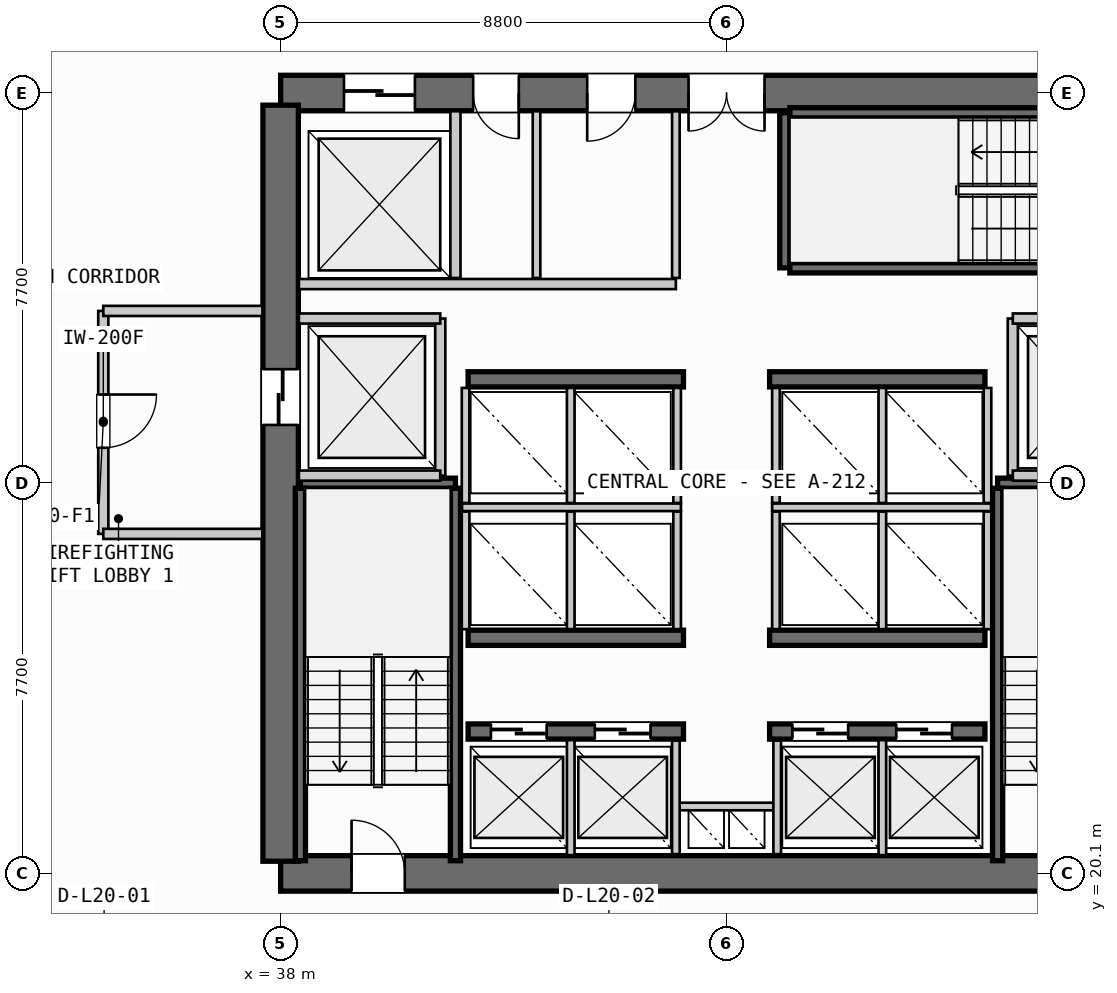
"""IFC4 building model, lengths in metres.
Left out: names, types, materials, properties, quantities, classifications, styles, units other than length and angle.
Written with IfcOpenShell. Run it as: python <this file> out.ifc"""

import sys

from ifc_helpers import new_model, si_unit, direction, frame, frame_2d, origin, place, context, subcontext, project, spatial, rectangle, extrude, source, transform, mapped, element, fill, save


model = new_model("IFC4")
c1 = context("Model", 3, precision=1e-05, world=origin(), true_north=direction((0.0, 1.0)))
c2 = subcontext(c1, "Body", "Model", "MODEL_VIEW")
j1 = project(units=[si_unit("LENGTHUNIT", "METRE"), si_unit("PLANEANGLEUNIT", "RADIAN")], contexts=[c1])
p1 = place(None, origin())
s1 = spatial("IfcSite", under=j1, at=p1, CompositionType="ELEMENT")
p2 = place(p1, origin())
s2 = spatial("IfcBuilding", under=s1, at=p2, CompositionType="ELEMENT")
p3 = place(p2, frame((0.0, 0.0, 85.6)))
s3 = spatial("IfcBuildingStorey", under=s2, at=p3, CompositionType="ELEMENT", Elevation=85.6)
p4 = place(p3, frame((38.0, 20.1, 0.0), z_axis=(0.0, 0.0, 1.0), x_axis=(1.0, 0.0, 0.0)))
e1 = element("IfcWall", 1, at=p4, inside=s3, PredefinedType="SHEAR", context=c2, shape_type="SweptSolid", body=[
    extrude(rectangle(XDim=17.6, YDim=0.7, at=frame_2d((8.8, 0.0))), origin(), (0.0, 0.0, 1.0), 3.35),
])
p5 = place(p4, frame((1.4, 0.0, 0.0)))
e2 = element("IfcOpeningElement", 2, at=p5, cuts=e1, PredefinedType="OPENING", context=c2, shape_type="SweptSolid", body=[
    extrude(rectangle(XDim=1.05, YDim=2.15, at=frame_2d((0.525, 1.075))), frame((0.0, 0.36, 0.0), z_axis=(0.0, -1.0, 0.0), x_axis=(1.0, 0.0, 0.0)), (0.0, 0.0, 1.0), 0.72),
])
p6 = place(p4, frame((15.15, 0.0, 0.0)))
e3 = element("IfcOpeningElement", 3, at=p6, cuts=e1, PredefinedType="OPENING", context=c2, shape_type="SweptSolid", body=[
    extrude(rectangle(XDim=1.05, YDim=2.15, at=frame_2d((0.525, 1.075))), frame((0.0, 0.36, 0.0), z_axis=(0.0, -1.0, 0.0), x_axis=(1.0, 0.0, 0.0)), (0.0, 0.0, 1.0), 0.72),
])
p7 = place(p3, frame((55.6, 35.5, 0.0), z_axis=(0.0, 0.0, 1.0), x_axis=(-1.0, 0.0, 0.0)))
e4 = element("IfcWall", 4, at=p7, inside=s3, PredefinedType="SHEAR", context=c2, shape_type="SweptSolid", body=[
    extrude(rectangle(XDim=17.6, YDim=0.7, at=frame_2d((8.8, 0.0))), origin(), (0.0, 0.0, 1.0), 3.35),
])
p8 = place(p7, frame((8.05, 0.0, 0.0)))
e5 = element("IfcOpeningElement", 5, at=p8, cuts=e4, PredefinedType="OPENING", context=c2, shape_type="SweptSolid", body=[
    extrude(rectangle(XDim=1.5, YDim=2.2, at=frame_2d((0.75, 1.1))), frame((0.0, 0.36, 0.0), z_axis=(0.0, -1.0, 0.0), x_axis=(1.0, 0.0, 0.0)), (0.0, 0.0, 1.0), 0.72),
])
p9 = place(p7, frame((14.95, 0.0, 0.0)))
e6 = element("IfcOpeningElement", 6, at=p9, cuts=e4, PredefinedType="OPENING", context=c2, shape_type="SweptSolid", body=[
    extrude(rectangle(XDim=1.4, YDim=2.3, at=frame_2d((0.7, 1.15))), frame((0.0, 0.36, 0.0), z_axis=(0.0, -1.0, 0.0), x_axis=(1.0, 0.0, 0.0)), (0.0, 0.0, 1.0), 0.72),
])
p10 = place(p7, frame((12.9, 0.0, 0.0)))
e7 = element("IfcOpeningElement", 7, at=p10, cuts=e4, PredefinedType="OPENING", context=c2, shape_type="SweptSolid", body=[
    extrude(rectangle(XDim=0.9, YDim=2.15, at=frame_2d((0.45, 1.075))), frame((0.0, 0.36, 0.0), z_axis=(0.0, -1.0, 0.0), x_axis=(1.0, 0.0, 0.0)), (0.0, 0.0, 1.0), 0.72),
])
p11 = place(p7, frame((10.6, 0.0, 0.0)))
e8 = element("IfcOpeningElement", 8, at=p11, cuts=e4, PredefinedType="OPENING", context=c2, shape_type="SweptSolid", body=[
    extrude(rectangle(XDim=0.95, YDim=2.15, at=frame_2d((0.475, 1.075))), frame((0.0, 0.36, 0.0), z_axis=(0.0, -1.0, 0.0), x_axis=(1.0, 0.0, 0.0)), (0.0, 0.0, 1.0), 0.72),
])
p12 = place(p3, frame((38.0, 35.26, 0.0), z_axis=(0.0, 0.0, 1.0), x_axis=(0.0, -1.0, 0.0)))
e9 = element("IfcWall", 9, at=p12, inside=s3, PredefinedType="SHEAR", context=c2, shape_type="SweptSolid", body=[
    extrude(rectangle(XDim=14.92, YDim=0.7, at=frame_2d((7.46, 0.0))), origin(), (0.0, 0.0, 1.0), 3.35),
])
p13 = place(p12, frame((5.21, 0.0, 0.0)))
e10 = element("IfcOpeningElement", 10, at=p13, cuts=e9, PredefinedType="OPENING", context=c2, shape_type="SweptSolid", body=[
    extrude(rectangle(XDim=1.1, YDim=2.2, at=frame_2d((0.55, 1.1))), frame((0.0, 0.36, 0.0), z_axis=(0.0, -1.0, 0.0), x_axis=(1.0, 0.0, 0.0)), (0.0, 0.0, 1.0), 0.72),
])
p14 = place(p3, frame((41.7, 22.9, 0.0), z_axis=(0.0, 0.0, 1.0), x_axis=(1.0, 0.0, 0.0)))
e11 = element("IfcWall", 11, at=p14, inside=s3, PredefinedType="SHEAR", context=c2, shape_type="SweptSolid", body=[
    extrude(rectangle(XDim=4.25, YDim=0.3, at=frame_2d((2.125, 0.0))), origin(), (0.0, 0.0, 1.0), 3.35),
])
p15 = place(p14, frame((0.45, 0.0, 0.0)))
e12 = element("IfcOpeningElement", 12, at=p15, cuts=e11, PredefinedType="OPENING", context=c2, shape_type="SweptSolid", body=[
    extrude(rectangle(XDim=1.1, YDim=2.2, at=frame_2d((0.55, 1.1))), frame((0.0, 0.16, 0.0), z_axis=(0.0, -1.0, 0.0), x_axis=(1.0, 0.0, 0.0)), (0.0, 0.0, 1.0), 0.32),
])
p16 = place(p14, frame((2.5, 0.0, 0.0)))
e13 = element("IfcOpeningElement", 13, at=p16, cuts=e11, PredefinedType="OPENING", context=c2, shape_type="SweptSolid", body=[
    extrude(rectangle(XDim=1.1, YDim=2.2, at=frame_2d((0.55, 1.1))), frame((0.0, 0.16, 0.0), z_axis=(0.0, -1.0, 0.0), x_axis=(1.0, 0.0, 0.0)), (0.0, 0.0, 1.0), 0.32),
])
p17 = place(p3, frame((47.65, 22.9, 0.0), z_axis=(0.0, 0.0, 1.0), x_axis=(1.0, 0.0, 0.0)))
e14 = element("IfcWall", 14, at=p17, inside=s3, PredefinedType="SHEAR", context=c2, shape_type="SweptSolid", body=[
    extrude(rectangle(XDim=4.25, YDim=0.3, at=frame_2d((2.125, 0.0))), origin(), (0.0, 0.0, 1.0), 3.35),
])
p18 = place(p17, frame((0.45, 0.0, 0.0)))
e15 = element("IfcOpeningElement", 15, at=p18, cuts=e14, PredefinedType="OPENING", context=c2, shape_type="SweptSolid", body=[
    extrude(rectangle(XDim=1.1, YDim=2.2, at=frame_2d((0.55, 1.1))), frame((0.0, 0.16, 0.0), z_axis=(0.0, -1.0, 0.0), x_axis=(1.0, 0.0, 0.0)), (0.0, 0.0, 1.0), 0.32),
])
p19 = place(p17, frame((2.5, 0.0, 0.0)))
e16 = element("IfcOpeningElement", 16, at=p19, cuts=e14, PredefinedType="OPENING", context=c2, shape_type="SweptSolid", body=[
    extrude(rectangle(XDim=1.1, YDim=2.2, at=frame_2d((0.55, 1.1))), frame((0.0, 0.16, 0.0), z_axis=(0.0, -1.0, 0.0), x_axis=(1.0, 0.0, 0.0)), (0.0, 0.0, 1.0), 0.32),
])
for number, where, z_axis, x_axis in (
    (17, (41.7, 24.75, 0.0), (0.0, 0.0, 1.0), (1.0, 0.0, 0.0)),
    (18, (47.65, 24.75, 0.0), (0.0, 0.0, 1.0), (1.0, 0.0, 0.0)),
    (19, (41.7, 29.85, 0.0), (0.0, 0.0, 1.0), (1.0, 0.0, 0.0)),
    (20, (47.65, 29.85, 0.0), (0.0, 0.0, 1.0), (1.0, 0.0, 0.0)),
):
    element("IfcWall", number, at=place(p3, frame(where, z_axis=z_axis, x_axis=x_axis)), inside=s3, PredefinedType="SHEAR", context=c2, shape_type="SweptSolid", body=[
        extrude(rectangle(XDim=4.25, YDim=0.3, at=frame_2d((2.125, 0.0))), origin(), (0.0, 0.0, 1.0), 3.35),
    ])
p20 = place(p3, frame((38.39, 27.8, 0.0), z_axis=(0.0, 0.0, 1.0), x_axis=(1.0, 0.0, 0.0)))
e21 = element("IfcWall", 21, at=p20, inside=s3, PredefinedType="SHEAR", context=c2, shape_type="SweptSolid", body=[
    extrude(rectangle(XDim=3.06, YDim=0.2, at=frame_2d((1.53, 0.0))), origin(), (0.0, 0.0, 1.0), 3.35),
])
for number, where, z_axis, x_axis in (
    (22, (41.45, 27.7, 0.0), (0.0, 0.0, 1.0), (0.0, -1.0, 0.0)),
    (23, (38.39, 20.35, 0.0), (0.0, 0.0, 1.0), (0.0, 1.0, 0.0)),
):
    element("IfcWall", number, at=place(p3, frame(where, z_axis=z_axis, x_axis=x_axis)), inside=s3, PredefinedType="SHEAR", context=c2, shape_type="SweptSolid", body=[
        extrude(rectangle(XDim=7.35, YDim=0.2, at=frame_2d((3.675, 0.0))), origin(), (0.0, 0.0, 1.0), 3.35),
    ])
p21 = place(p3, frame((52.15, 27.8, 0.0), z_axis=(0.0, 0.0, 1.0), x_axis=(1.0, 0.0, 0.0)))
e24 = element("IfcWall", 24, at=p21, inside=s3, PredefinedType="SHEAR", context=c2, shape_type="SweptSolid", body=[
    extrude(rectangle(XDim=3.06, YDim=0.2, at=frame_2d((1.53, 0.0))), origin(), (0.0, 0.0, 1.0), 3.35),
])
p22 = place(p3, frame((52.15, 20.35, 0.0), z_axis=(0.0, 0.0, 1.0), x_axis=(0.0, 1.0, 0.0)))
e25 = element("IfcWall", 25, at=p22, inside=s3, PredefinedType="SHEAR", context=c2, shape_type="SweptSolid", body=[
    extrude(rectangle(XDim=7.35, YDim=0.2, at=frame_2d((3.675, 0.0))), origin(), (0.0, 0.0, 1.0), 3.35),
])
p23 = place(p3, frame((47.95, 32.05, 0.0), z_axis=(0.0, 0.0, 1.0), x_axis=(0.0, 1.0, 0.0)))
e26 = element("IfcWall", 26, at=p23, inside=s3, PredefinedType="SHEAR", context=c2, shape_type="SweptSolid", body=[
    extrude(rectangle(XDim=3.06, YDim=0.2, at=frame_2d((1.53, 0.0))), origin(), (0.0, 0.0, 1.0), 3.35),
])
for number, where, z_axis, x_axis in (
    (27, (48.05, 35.11, 0.0), (0.0, 0.0, 1.0), (1.0, 0.0, 0.0)),
    (28, (55.4, 32.05, 0.0), (0.0, 0.0, 1.0), (-1.0, 0.0, 0.0)),
):
    element("IfcWall", number, at=place(p3, frame(where, z_axis=z_axis, x_axis=x_axis)), inside=s3, PredefinedType="SHEAR", context=c2, shape_type="SweptSolid", body=[
        extrude(rectangle(XDim=7.35, YDim=0.2, at=frame_2d((3.675, 0.0))), origin(), (0.0, 0.0, 1.0), 3.35),
    ])
p24 = place(p3, frame((45.8, 21.42, 0.0), z_axis=(0.0, 0.0, 1.0), x_axis=(1.0, 0.0, 0.0)))
e29 = element("IfcWall", 29, at=p24, inside=s3, PredefinedType="PARTITIONING", context=c2, shape_type="SweptSolid", body=[
    extrude(rectangle(XDim=2.0, YDim=0.15, at=frame_2d((1.0, 0.0))), origin(), (0.0, 0.0, 1.0), 2.28),
])
for number, where, z_axis, x_axis in (
    (30, (45.8, 20.48, 0.0), (0.0, 0.0, 1.0), (0.0, 1.0, 0.0)),
    (31, (47.8, 20.48, 0.0), (0.0, 0.0, 1.0), (0.0, 1.0, 0.0)),
):
    element("IfcWall", number, at=place(p3, frame(where, z_axis=z_axis, x_axis=x_axis)), inside=s3, PredefinedType="PARTITIONING", context=c2, shape_type="SweptSolid", body=[
        extrude(rectangle(XDim=2.24, YDim=0.15, at=frame_2d((1.12, 0.0))), origin(), (0.0, 0.0, 1.0), 2.28),
    ])
p25 = place(p3, frame((41.15, 27.95, 0.0), z_axis=(0.0, 0.0, 1.0), x_axis=(0.0, 1.0, 0.0)))
e32 = element("IfcWall", 32, at=p25, inside=s3, PredefinedType="PARTITIONING", context=c2, shape_type="SweptSolid", body=[
    extrude(rectangle(XDim=3.1, YDim=0.2, at=frame_2d((1.55, 0.0))), origin(), (0.0, 0.0, 1.0), 2.28),
])
for number, where, z_axis, x_axis in (
    (33, (38.36, 27.95, 0.0), (0.0, 0.0, 1.0), (1.0, 0.0, 0.0)),
    (34, (38.36, 31.05, 0.0), (0.0, 0.0, 1.0), (1.0, 0.0, 0.0)),
):
    element("IfcWall", number, at=place(p3, frame(where, z_axis=z_axis, x_axis=x_axis)), inside=s3, PredefinedType="PARTITIONING", context=c2, shape_type="SweptSolid", body=[
        extrude(rectangle(XDim=2.79, YDim=0.2, at=frame_2d((1.395, 0.0))), origin(), (0.0, 0.0, 1.0), 2.28),
    ])
p26 = place(p3, frame((34.5, 31.2, 0.0), z_axis=(0.0, 0.0, 1.0), x_axis=(0.0, -1.0, 0.0)))
e35 = element("IfcWall", 35, at=p26, inside=s3, PredefinedType="PARTITIONING", context=c2, shape_type="SweptSolid", body=[
    extrude(rectangle(XDim=4.4, YDim=0.2, at=frame_2d((2.2, 0.0))), origin(), (0.0, 0.0, 1.0), 2.28),
])
p27 = place(p26, frame((1.65, 0.0, 0.0)))
e36 = element("IfcOpeningElement", 36, at=p27, cuts=e35, PredefinedType="OPENING", context=c2, shape_type="SweptSolid", body=[
    extrude(rectangle(XDim=1.05, YDim=2.15, at=frame_2d((0.525, 1.075))), frame((0.0, 0.11, 0.0), z_axis=(0.0, -1.0, 0.0), x_axis=(1.0, 0.0, 0.0)), (0.0, 0.0, 1.0), 0.22),
])
for number, where, z_axis, x_axis in (
    (37, (34.5, 26.8, 0.0), (0.0, 0.0, 1.0), (1.0, 0.0, 0.0)),
    (38, (34.5, 31.2, 0.0), (0.0, 0.0, 1.0), (1.0, 0.0, 0.0)),
):
    element("IfcWall", number, at=place(p3, frame(where, z_axis=z_axis, x_axis=x_axis)), inside=s3, PredefinedType="PARTITIONING", context=c2, shape_type="SweptSolid", body=[
        extrude(rectangle(XDim=3.14, YDim=0.2, at=frame_2d((1.57, 0.0))), origin(), (0.0, 0.0, 1.0), 2.28),
    ])
p28 = place(p3, frame((52.45, 27.95, 0.0), z_axis=(0.0, 0.0, 1.0), x_axis=(0.0, 1.0, 0.0)))
e39 = element("IfcWall", 39, at=p28, inside=s3, PredefinedType="PARTITIONING", context=c2, shape_type="SweptSolid", body=[
    extrude(rectangle(XDim=3.1, YDim=0.2, at=frame_2d((1.55, 0.0))), origin(), (0.0, 0.0, 1.0), 2.28),
])
for number, where, z_axis, x_axis in (
    (40, (52.45, 27.95, 0.0), (0.0, 0.0, 1.0), (1.0, 0.0, 0.0)),
    (41, (52.45, 31.05, 0.0), (0.0, 0.0, 1.0), (1.0, 0.0, 0.0)),
):
    element("IfcWall", number, at=place(p3, frame(where, z_axis=z_axis, x_axis=x_axis)), inside=s3, PredefinedType="PARTITIONING", context=c2, shape_type="SweptSolid", body=[
        extrude(rectangle(XDim=2.79, YDim=0.2, at=frame_2d((1.395, 0.0))), origin(), (0.0, 0.0, 1.0), 2.28),
    ])
for number, where, z_axis, x_axis in (
    (42, (43.725, 20.46, 0.0), (0.0, 0.0, 1.0), (0.0, 1.0, 0.0)),
    (43, (49.875, 20.46, 0.0), (0.0, 0.0, 1.0), (0.0, 1.0, 0.0)),
):
    element("IfcWall", number, at=place(p3, frame(where, z_axis=z_axis, x_axis=x_axis)), inside=s3, PredefinedType="PARTITIONING", context=c2, shape_type="SweptSolid", body=[
        extrude(rectangle(XDim=2.27, YDim=0.15, at=frame_2d((1.135, 0.0))), origin(), (0.0, 0.0, 1.0), 2.28),
    ])
p29 = place(p3, frame((41.58, 27.325, 0.0), z_axis=(0.0, 0.0, 1.0), x_axis=(1.0, 0.0, 0.0)))
e44 = element("IfcWall", 44, at=p29, inside=s3, PredefinedType="PARTITIONING", context=c2, shape_type="SweptSolid", body=[
    extrude(rectangle(XDim=4.32, YDim=0.15, at=frame_2d((2.16, 0.0))), origin(), (0.0, 0.0, 1.0), 2.28),
])
p30 = place(p3, frame((47.7, 27.325, 0.0), z_axis=(0.0, 0.0, 1.0), x_axis=(1.0, 0.0, 0.0)))
e45 = element("IfcWall", 45, at=p30, inside=s3, PredefinedType="PARTITIONING", context=c2, shape_type="SweptSolid", body=[
    extrude(rectangle(XDim=4.32, YDim=0.15, at=frame_2d((2.16, 0.0))), origin(), (0.0, 0.0, 1.0), 2.28),
])
for number, where, z_axis, x_axis in (
    (46, (41.65, 24.92, 0.0), (0.0, 0.0, 1.0), (0.0, 1.0, 0.0)),
    (47, (43.725, 24.92, 0.0), (0.0, 0.0, 1.0), (0.0, 1.0, 0.0)),
    (48, (45.825, 24.92, 0.0), (0.0, 0.0, 1.0), (0.0, 1.0, 0.0)),
    (49, (47.775, 24.92, 0.0), (0.0, 0.0, 1.0), (0.0, 1.0, 0.0)),
    (50, (49.875, 24.92, 0.0), (0.0, 0.0, 1.0), (0.0, 1.0, 0.0)),
    (51, (51.95, 24.92, 0.0), (0.0, 0.0, 1.0), (0.0, 1.0, 0.0)),
):
    element("IfcWall", number, at=place(p3, frame(where, z_axis=z_axis, x_axis=x_axis)), inside=s3, PredefinedType="PARTITIONING", context=c2, shape_type="SweptSolid", body=[
        extrude(rectangle(XDim=2.32, YDim=0.15, at=frame_2d((1.16, 0.0))), origin(), (0.0, 0.0, 1.0), 2.28),
    ])
for number, where, z_axis, x_axis in (
    (52, (41.65, 27.41, 0.0), (0.0, 0.0, 1.0), (0.0, 1.0, 0.0)),
    (53, (43.725, 27.41, 0.0), (0.0, 0.0, 1.0), (0.0, 1.0, 0.0)),
    (54, (45.825, 27.41, 0.0), (0.0, 0.0, 1.0), (0.0, 1.0, 0.0)),
    (55, (47.775, 27.41, 0.0), (0.0, 0.0, 1.0), (0.0, 1.0, 0.0)),
    (56, (49.875, 27.41, 0.0), (0.0, 0.0, 1.0), (0.0, 1.0, 0.0)),
    (57, (51.95, 27.41, 0.0), (0.0, 0.0, 1.0), (0.0, 1.0, 0.0)),
):
    element("IfcWall", number, at=place(p3, frame(where, z_axis=z_axis, x_axis=x_axis)), inside=s3, PredefinedType="PARTITIONING", context=c2, shape_type="SweptSolid", body=[
        extrude(rectangle(XDim=2.27, YDim=0.15, at=frame_2d((1.135, 0.0))), origin(), (0.0, 0.0, 1.0), 2.28),
    ])
p31 = place(p3, frame((41.45, 31.85, 0.0), z_axis=(0.0, 0.0, 1.0), x_axis=(0.0, 1.0, 0.0)))
e58 = element("IfcWall", 58, at=p31, inside=s3, PredefinedType="PARTITIONING", context=c2, shape_type="SweptSolid", body=[
    extrude(rectangle(XDim=3.29, YDim=0.2, at=frame_2d((1.645, 0.0))), origin(), (0.0, 0.0, 1.0), 2.28),
])
p32 = place(p3, frame((38.36, 31.73, 0.0), z_axis=(0.0, 0.0, 1.0), x_axis=(1.0, 0.0, 0.0)))
e59 = element("IfcWall", 59, at=p32, inside=s3, PredefinedType="PARTITIONING", context=c2, shape_type="SweptSolid", body=[
    extrude(rectangle(XDim=7.44, YDim=0.2, at=frame_2d((3.72, 0.0))), origin(), (0.0, 0.0, 1.0), 2.28),
])
p33 = place(p3, frame((45.8, 31.85, 0.0), z_axis=(0.0, 0.0, 1.0), x_axis=(0.0, 1.0, 0.0)))
e60 = element("IfcWall", 60, at=p33, inside=s3, PredefinedType="PARTITIONING", context=c2, shape_type="SweptSolid", body=[
    extrude(rectangle(XDim=3.29, YDim=0.15, at=frame_2d((1.645, 0.0))), origin(), (0.0, 0.0, 1.0), 2.28),
])
p34 = place(p3, frame((43.05, 31.85, 0.0), z_axis=(0.0, 0.0, 1.0), x_axis=(0.0, 1.0, 0.0)))
e61 = element("IfcWall", 61, at=p34, inside=s3, PredefinedType="PLUMBINGWALL", context=c2, shape_type="SweptSolid", body=[
    extrude(rectangle(XDim=3.29, YDim=0.15, at=frame_2d((1.645, 0.0))), origin(), (0.0, 0.0, 1.0), 2.28),
])
m1 = source(origin(), c2, "Body", "SweptSolid", [
    extrude(rectangle(XDim=1.05, YDim=2.15, at=frame_2d((0.525, 1.075))), frame((0.0, 0.025, 0.0), z_axis=(0.0, -1.0, 0.0), x_axis=(1.0, 0.0, 0.0)), (0.0, 0.0, 1.0), 0.05),
])
p35 = place(p5, origin())
e62 = element("IfcDoor", 62, at=p35, inside=s3, OperationType="SINGLE_SWING_LEFT", PredefinedType="DOOR", context=c2, shape_type="MappedRepresentation", body=[
    mapped(m1, transform((0.0, 0.0, 0.0), scale=1.0)),
])
fill(e2, e62)
m2 = source(origin(), c2, "Body", "SweptSolid", [
    extrude(rectangle(XDim=1.5, YDim=2.2, at=frame_2d((0.75, 1.1))), frame((0.0, 0.025, 0.0), z_axis=(0.0, -1.0, 0.0), x_axis=(1.0, 0.0, 0.0)), (0.0, 0.0, 1.0), 0.05),
])
p36 = place(p8, origin())
e63 = element("IfcDoor", 63, at=p36, inside=s3, OperationType="DOUBLE_DOOR_SINGLE_SWING", PredefinedType="DOOR", context=c2, shape_type="MappedRepresentation", body=[
    mapped(m2, transform((0.0, 0.0, 0.0), scale=1.0)),
])
fill(e5, e63)
m3 = source(origin(), c2, "Body", "SweptSolid", [
    extrude(rectangle(XDim=1.1, YDim=2.2, at=frame_2d((0.55, 1.1))), frame((0.0, 0.025, 0.0), z_axis=(0.0, -1.0, 0.0), x_axis=(1.0, 0.0, 0.0)), (0.0, 0.0, 1.0), 0.05),
])
p37 = place(p13, origin())
e64 = element("IfcDoor", 64, at=p37, inside=s3, OperationType="SLIDING_TO_LEFT", PredefinedType="DOOR", context=c2, shape_type="MappedRepresentation", body=[
    mapped(m3, transform((0.0, 0.0, 0.0), scale=1.0)),
])
fill(e10, e64)
p38 = place(p15, origin())
e65 = element("IfcDoor", 65, at=p38, inside=s3, OperationType="SLIDING_TO_LEFT", PredefinedType="DOOR", context=c2, shape_type="MappedRepresentation", body=[
    mapped(m3, transform((0.0, 0.0, 0.0), scale=1.0)),
])
fill(e12, e65)
p39 = place(p16, origin())
e66 = element("IfcDoor", 66, at=p39, inside=s3, OperationType="SLIDING_TO_LEFT", PredefinedType="DOOR", context=c2, shape_type="MappedRepresentation", body=[
    mapped(m3, transform((0.0, 0.0, 0.0), scale=1.0)),
])
fill(e13, e66)
p40 = place(p18, origin())
e67 = element("IfcDoor", 67, at=p40, inside=s3, OperationType="SLIDING_TO_LEFT", PredefinedType="DOOR", context=c2, shape_type="MappedRepresentation", body=[
    mapped(m3, transform((0.0, 0.0, 0.0), scale=1.0)),
])
fill(e15, e67)
p41 = place(p19, origin())
e68 = element("IfcDoor", 68, at=p41, inside=s3, OperationType="SLIDING_TO_LEFT", PredefinedType="DOOR", context=c2, shape_type="MappedRepresentation", body=[
    mapped(m3, transform((0.0, 0.0, 0.0), scale=1.0)),
])
fill(e16, e68)
m4 = source(origin(), c2, "Body", "SweptSolid", [
    extrude(rectangle(XDim=1.4, YDim=2.3, at=frame_2d((0.7, 1.15))), frame((0.0, 0.025, 0.0), z_axis=(0.0, -1.0, 0.0), x_axis=(1.0, 0.0, 0.0)), (0.0, 0.0, 1.0), 0.05),
])
p42 = place(p9, origin())
e69 = element("IfcDoor", 69, at=p42, inside=s3, OperationType="SLIDING_TO_RIGHT", PredefinedType="DOOR", context=c2, shape_type="MappedRepresentation", body=[
    mapped(m4, transform((0.0, 0.0, 0.0), scale=1.0)),
])
fill(e6, e69)
m5 = source(origin(), c2, "Body", "SweptSolid", [
    extrude(rectangle(XDim=0.9, YDim=2.15, at=frame_2d((0.45, 1.075))), frame((0.0, 0.025, 0.0), z_axis=(0.0, -1.0, 0.0), x_axis=(1.0, 0.0, 0.0)), (0.0, 0.0, 1.0), 0.05),
])
p43 = place(p10, origin())
e70 = element("IfcDoor", 70, at=p43, inside=s3, OperationType="SINGLE_SWING_LEFT", PredefinedType="DOOR", context=c2, shape_type="MappedRepresentation", body=[
    mapped(m5, transform((0.0, 0.0, 0.0), scale=1.0)),
])
fill(e7, e70)
m6 = source(origin(), c2, "Body", "SweptSolid", [
    extrude(rectangle(XDim=0.95, YDim=2.15, at=frame_2d((0.475, 1.075))), frame((0.0, 0.025, 0.0), z_axis=(0.0, -1.0, 0.0), x_axis=(1.0, 0.0, 0.0)), (0.0, 0.0, 1.0), 0.05),
])
p44 = place(p11, origin())
e71 = element("IfcDoor", 71, at=p44, inside=s3, OperationType="SINGLE_SWING_RIGHT", PredefinedType="DOOR", context=c2, shape_type="MappedRepresentation", body=[
    mapped(m6, transform((0.0, 0.0, 0.0), scale=1.0)),
])
fill(e8, e71)
p45 = place(p27, origin())
e72 = element("IfcDoor", 72, at=p45, inside=s3, OperationType="SINGLE_SWING_LEFT", PredefinedType="DOOR", context=c2, shape_type="MappedRepresentation", body=[
    mapped(m1, transform((0.0, 0.0, 0.0), scale=1.0)),
])
fill(e36, e72)
save(model, sys.argv[1])
